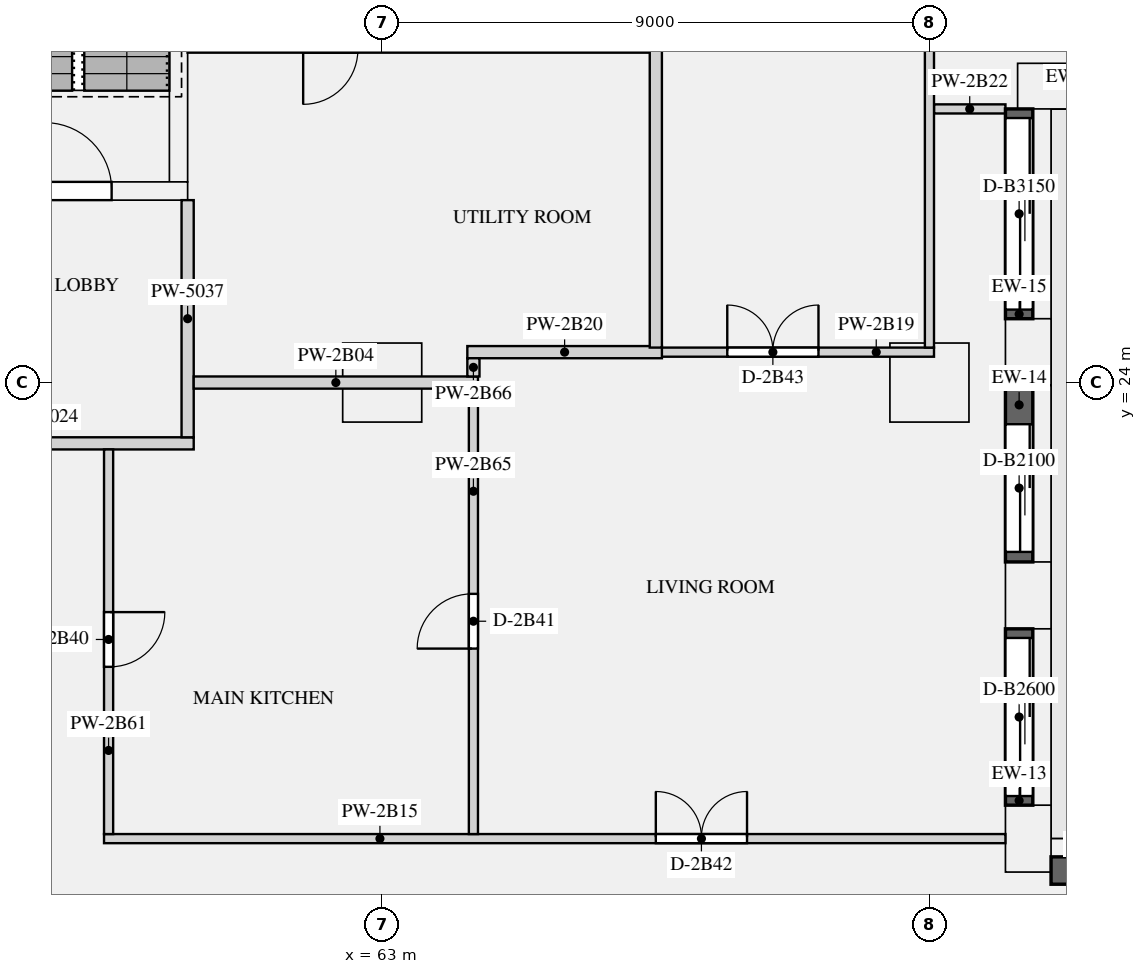
"""IFC4 building model, lengths in metres.
Left out: names, types, materials, properties, quantities, classifications, styles, units other than length and angle.
Written with IfcOpenShell. Run it as: python <this file> out.ifc"""

import sys

from ifc_helpers import new_model, si_unit, direction, frame, frame_2d, origin, origin_2d, place, context, subcontext, project, spatial, rectangle, extrude, element, fill, save


model = new_model("IFC4")
c1 = context("Model", 3, precision=1e-05, world=origin(), true_north=direction((0.0, 1.0)))
c2 = subcontext(c1, "Body", "Model", "MODEL_VIEW")
j1 = project(units=[si_unit("LENGTHUNIT", "METRE"), si_unit("PLANEANGLEUNIT", "RADIAN")], contexts=[c1])
p1 = place(None, origin())
s1 = spatial("IfcSite", under=j1, at=p1, CompositionType="ELEMENT")
p2 = place(p1, origin())
s2 = spatial("IfcBuilding", under=s1, at=p2, CompositionType="ELEMENT")
p3 = place(p2, frame((0.0, 0.0, 93.0)))
s3 = spatial("IfcBuildingStorey", under=s2, at=p3, CompositionType="ELEMENT", Elevation=93.0)
for number, where, z_axis, x_axis in (
    (1, (73.625, 16.5, 0.0), (0.0, 0.0, 1.0), (0.0, 1.0, 0.0)),
    (2, (73.625, 20.5, 0.0), (0.0, 0.0, 1.0), (0.0, 1.0, 0.0)),
    (3, (73.625, 24.5, 0.0), (0.0, 0.0, 1.0), (0.0, 1.0, 0.0)),
    (4, (74.0, 28.875, 0.0), (0.0, 0.0, 1.0), (1.0, 0.0, 0.0)),
):
    element("IfcColumn", number, at=place(p3, frame(where, z_axis=z_axis, x_axis=x_axis)), inside=s3, PredefinedType="USERDEFINED", context=c2, shape_type="SweptSolid", body=[
        extrude(rectangle(XDim=1.1, YDim=0.75, at=origin_2d()), origin(), (0.0, 0.0, 1.0), 3.15),
    ])
for number, where, z_axis, x_axis in (
    (5, (63.0, 24.0, 0.0), (0.0, 0.0, 1.0), (1.0, 0.0, 0.0)),
    (6, (72.0, 24.0, 0.0), (0.0, 0.0, 1.0), (1.0, 0.0, 0.0)),
):
    element("IfcColumn", number, at=place(p3, frame(where, z_axis=z_axis, x_axis=x_axis)), inside=s3, PredefinedType="COLUMN", context=c2, shape_type="SweptSolid", body=[
        extrude(rectangle(XDim=1.3, YDim=1.3, at=origin_2d()), origin(), (0.0, 0.0, 1.0), 3.15),
    ])
p4 = place(p3, frame((56.2, 27.15, 0.0), z_axis=(0.0, 0.0, 1.0), x_axis=(1.0, 0.0, 0.0)))
e7 = element("IfcWall", 7, at=p4, inside=s3, PredefinedType="SHEAR", context=c2, shape_type="SweptSolid", body=[
    extrude(rectangle(XDim=3.6, YDim=0.3, at=frame_2d((1.8, 0.0))), origin(), (0.0, 0.0, 1.0), 3.15),
])
p5 = place(p4, frame((1.25, 0.0, 0.0)))
e8 = element("IfcOpeningElement", 8, at=p5, cuts=e7, PredefinedType="OPENING", context=c2, shape_type="SweptSolid", body=[
    extrude(rectangle(XDim=1.1, YDim=2.1, at=frame_2d((0.55, 1.05))), frame((0.0, 0.16, 0.0), z_axis=(0.0, -1.0, 0.0), x_axis=(1.0, 0.0, 0.0)), (0.0, 0.0, 1.0), 0.32),
])
p6 = place(p3, frame((59.65, 27.3, 0.0), z_axis=(0.0, 0.0, 1.0), x_axis=(0.0, 1.0, 0.0)))
e9 = element("IfcWall", 9, at=p6, inside=s3, PredefinedType="SHEAR", context=c2, shape_type="SweptSolid", body=[
    extrude(rectangle(XDim=7.8, YDim=0.3, at=frame_2d((3.9, 0.0))), origin(), (0.0, 0.0, 1.0), 3.15),
])
p7 = place(p3, frame((75.4, 15.975, 0.9), z_axis=(0.0, 0.0, 1.0), x_axis=(-1.0, 0.0, 0.0)))
e10 = element("IfcWall", 10, at=p7, inside=s3, PredefinedType="SOLIDWALL", context=c2, shape_type="SweptSolid", body=[
    extrude(rectangle(XDim=1.4, YDim=0.45, at=frame_2d((0.7, 0.0))), origin(), (0.0, 0.0, 1.0), 1.93),
])
p8 = place(p3, frame((73.475, 17.05, 0.0), z_axis=(0.0, 0.0, 1.0), x_axis=(0.0, 1.0, 0.0)))
e11 = element("IfcWall", 11, at=p8, inside=s3, PredefinedType="SOLIDWALL", context=c2, shape_type="SweptSolid", body=[
    extrude(rectangle(XDim=2.9, YDim=0.45, at=frame_2d((1.45, 0.0))), origin(), (0.0, 0.0, 1.0), 2.83),
])
p9 = place(p8, frame((0.15, 0.0, 0.0)))
e12 = element("IfcOpeningElement", 12, at=p9, cuts=e11, PredefinedType="OPENING", context=c2, shape_type="SweptSolid", body=[
    extrude(rectangle(XDim=2.6, YDim=2.3, at=frame_2d((1.3, 1.15))), frame((0.0, 0.235, 0.0), z_axis=(0.0, -1.0, 0.0), x_axis=(1.0, 0.0, 0.0)), (0.0, 0.0, 1.0), 0.47),
])
p10 = place(p3, frame((73.475, 21.05, 0.0), z_axis=(0.0, 0.0, 1.0), x_axis=(0.0, 1.0, 0.0)))
e13 = element("IfcWall", 13, at=p10, inside=s3, PredefinedType="SOLIDWALL", context=c2, shape_type="SweptSolid", body=[
    extrude(rectangle(XDim=2.9, YDim=0.45, at=frame_2d((1.45, 0.0))), origin(), (0.0, 0.0, 1.0), 2.83),
])
p11 = place(p10, frame((0.165, 0.0, 0.0)))
e14 = element("IfcOpeningElement", 14, at=p11, cuts=e13, PredefinedType="OPENING", context=c2, shape_type="SweptSolid", body=[
    extrude(rectangle(XDim=2.1, YDim=2.3, at=frame_2d((1.05, 1.15))), frame((0.0, 0.235, 0.0), z_axis=(0.0, -1.0, 0.0), x_axis=(1.0, 0.0, 0.0)), (0.0, 0.0, 1.0), 0.47),
])
p12 = place(p3, frame((73.475, 25.05, 0.0), z_axis=(0.0, 0.0, 1.0), x_axis=(0.0, 1.0, 0.0)))
e15 = element("IfcWall", 15, at=p12, inside=s3, PredefinedType="SOLIDWALL", context=c2, shape_type="SweptSolid", body=[
    extrude(rectangle(XDim=3.45, YDim=0.45, at=frame_2d((1.725, 0.0))), origin(), (0.0, 0.0, 1.0), 2.83),
])
p13 = place(p12, frame((0.15, 0.0, 0.0)))
e16 = element("IfcOpeningElement", 16, at=p13, cuts=e15, PredefinedType="OPENING", context=c2, shape_type="SweptSolid", body=[
    extrude(rectangle(XDim=3.15, YDim=2.3, at=frame_2d((1.575, 1.15))), frame((0.0, 0.235, 0.0), z_axis=(0.0, -1.0, 0.0), x_axis=(1.0, 0.0, 0.0)), (0.0, 0.0, 1.0), 0.47),
])
p14 = place(p3, frame((54.9, 23.0, 0.0), z_axis=(0.0, 0.0, 1.0), x_axis=(1.0, 0.0, 0.0)))
e17 = element("IfcWall", 17, at=p14, inside=s3, PredefinedType="PARTITIONING", context=c2, shape_type="SweptSolid", body=[
    extrude(rectangle(XDim=5.0, YDim=0.2, at=frame_2d((2.5, 0.0))), origin(), (0.0, 0.0, 1.0), 2.83),
])
p15 = place(p3, frame((59.8, 23.1, 0.0), z_axis=(0.0, 0.0, 1.0), x_axis=(0.0, 1.0, 0.0)))
e18 = element("IfcWall", 18, at=p15, inside=s3, PredefinedType="PARTITIONING", context=c2, shape_type="SweptSolid", body=[
    extrude(rectangle(XDim=3.9, YDim=0.2, at=frame_2d((1.95, 0.0))), origin(), (0.0, 0.0, 1.0), 2.83),
])
p16 = place(p3, frame((59.9, 24.0, 0.0), z_axis=(0.0, 0.0, 1.0), x_axis=(1.0, 0.0, 0.0)))
e19 = element("IfcWall", 19, at=p16, inside=s3, PredefinedType="PARTITIONING", context=c2, shape_type="SweptSolid", body=[
    extrude(rectangle(XDim=4.675, YDim=0.2, at=frame_2d((2.337, 0.0))), origin(), (0.0, 0.0, 1.0), 2.83),
])
p17 = place(p3, frame((58.425, 16.5, 0.0), z_axis=(0.0, 0.0, 1.0), x_axis=(1.0, 0.0, 0.0)))
e20 = element("IfcWall", 20, at=p17, inside=s3, PredefinedType="PARTITIONING", context=c2, shape_type="SweptSolid", body=[
    extrude(rectangle(XDim=14.825, YDim=0.15, at=frame_2d((7.413, 0.0))), origin(), (0.0, 0.0, 1.0), 2.83),
])
p18 = place(p17, frame((9.075, 0.0, 0.0)))
e21 = element("IfcOpeningElement", 21, at=p18, cuts=e20, PredefinedType="OPENING", context=c2, shape_type="SweptSolid", body=[
    extrude(rectangle(XDim=1.5, YDim=2.1, at=frame_2d((0.75, 1.05))), frame((0.0, 0.085, 0.0), z_axis=(0.0, -1.0, 0.0), x_axis=(1.0, 0.0, 0.0)), (0.0, 0.0, 1.0), 0.17),
])
p19 = place(p3, frame((67.4, 24.5, 0.0), z_axis=(0.0, 0.0, 1.0), x_axis=(1.0, 0.0, 0.0)))
e22 = element("IfcWall", 22, at=p19, inside=s3, PredefinedType="PARTITIONING", context=c2, shape_type="SweptSolid", body=[
    extrude(rectangle(XDim=4.675, YDim=0.15, at=frame_2d((2.337, 0.0))), origin(), (0.0, 0.0, 1.0), 2.83),
])
p20 = place(p19, frame((1.275, 0.0, 0.0)))
e23 = element("IfcOpeningElement", 23, at=p20, cuts=e22, PredefinedType="OPENING", context=c2, shape_type="SweptSolid", body=[
    extrude(rectangle(XDim=1.5, YDim=2.1, at=frame_2d((0.75, 1.05))), frame((0.0, 0.085, 0.0), z_axis=(0.0, -1.0, 0.0), x_axis=(1.0, 0.0, 0.0)), (0.0, 0.0, 1.0), 0.17),
])
p21 = place(p3, frame((64.4, 24.5, 0.0), z_axis=(0.0, 0.0, 1.0), x_axis=(1.0, 0.0, 0.0)))
e24 = element("IfcWall", 24, at=p21, inside=s3, PredefinedType="PARTITIONING", context=c2, shape_type="SweptSolid", body=[
    extrude(rectangle(XDim=3.2, YDim=0.2, at=frame_2d((1.6, 0.0))), origin(), (0.0, 0.0, 1.0), 2.83),
])
p22 = place(p3, frame((72.075, 28.5, 0.0), z_axis=(0.0, 0.0, 1.0), x_axis=(1.0, 0.0, 0.0)))
e25 = element("IfcWall", 25, at=p22, inside=s3, PredefinedType="PARTITIONING", context=c2, shape_type="SweptSolid", body=[
    extrude(rectangle(XDim=1.175, YDim=0.15, at=frame_2d((0.587, 0.0))), origin(), (0.0, 0.0, 1.0), 2.83),
])
p23 = place(p3, frame((67.5, 24.575, 0.0), z_axis=(0.0, 0.0, 1.0), x_axis=(0.0, 1.0, 0.0)))
e26 = element("IfcWall", 26, at=p23, inside=s3, PredefinedType="PARTITIONING", context=c2, shape_type="SweptSolid", body=[
    extrude(rectangle(XDim=20.175, YDim=0.2, at=frame_2d((10.087, 0.0))), origin(), (0.0, 0.0, 1.0), 2.83),
])
p24 = place(p3, frame((58.5, 16.575, 0.0), z_axis=(0.0, 0.0, 1.0), x_axis=(0.0, 1.0, 0.0)))
e27 = element("IfcWall", 27, at=p24, inside=s3, PredefinedType="PARTITIONING", context=c2, shape_type="SweptSolid", body=[
    extrude(rectangle(XDim=6.325, YDim=0.15, at=frame_2d((3.163, 0.0))), origin(), (0.0, 0.0, 1.0), 2.83),
])
p25 = place(p24, frame((2.75, 0.0, 0.0)))
e28 = element("IfcOpeningElement", 28, at=p25, cuts=e27, PredefinedType="OPENING", context=c2, shape_type="SweptSolid", body=[
    extrude(rectangle(XDim=0.9, YDim=2.1, at=frame_2d((0.45, 1.05))), frame((0.0, 0.085, 0.0), z_axis=(0.0, -1.0, 0.0), x_axis=(1.0, 0.0, 0.0)), (0.0, 0.0, 1.0), 0.17),
])
p26 = place(p3, frame((64.5, 16.575, 0.0), z_axis=(0.0, 0.0, 1.0), x_axis=(0.0, 1.0, 0.0)))
e29 = element("IfcWall", 29, at=p26, inside=s3, PredefinedType="PARTITIONING", context=c2, shape_type="SweptSolid", body=[
    extrude(rectangle(XDim=7.325, YDim=0.15, at=frame_2d((3.663, 0.0))), origin(), (0.0, 0.0, 1.0), 2.83),
])
p27 = place(p26, frame((3.05, 0.0, 0.0)))
e30 = element("IfcOpeningElement", 30, at=p27, cuts=e29, PredefinedType="OPENING", context=c2, shape_type="SweptSolid", body=[
    extrude(rectangle(XDim=0.9, YDim=2.1, at=frame_2d((0.45, 1.05))), frame((0.0, 0.085, 0.0), z_axis=(0.0, -1.0, 0.0), x_axis=(1.0, 0.0, 0.0)), (0.0, 0.0, 1.0), 0.17),
])
p28 = place(p3, frame((64.5, 24.1, 0.0), z_axis=(0.0, 0.0, 1.0), x_axis=(0.0, 1.0, 0.0)))
e31 = element("IfcWall", 31, at=p28, inside=s3, PredefinedType="PARTITIONING", context=c2, shape_type="SweptSolid", body=[
    extrude(rectangle(XDim=0.3, YDim=0.2, at=frame_2d((0.15, 0.0))), origin(), (0.0, 0.0, 1.0), 2.83),
])
p29 = place(p3, frame((72.0, 24.575, 0.0), z_axis=(0.0, 0.0, 1.0), x_axis=(0.0, 1.0, 0.0)))
e32 = element("IfcWall", 32, at=p29, inside=s3, PredefinedType="PARTITIONING", context=c2, shape_type="SweptSolid", body=[
    extrude(rectangle(XDim=15.675, YDim=0.15, at=frame_2d((7.837, 0.0))), origin(), (0.0, 0.0, 1.0), 2.83),
])
p30 = place(p29, frame((6.65, 0.0, 0.0)))
e33 = element("IfcOpeningElement", 33, at=p30, cuts=e32, PredefinedType="OPENING", context=c2, shape_type="SweptSolid", body=[
    extrude(rectangle(XDim=0.9, YDim=2.1, at=frame_2d((0.45, 1.05))), frame((0.0, 0.085, 0.0), z_axis=(0.0, -1.0, 0.0), x_axis=(1.0, 0.0, 0.0)), (0.0, 0.0, 1.0), 0.17),
])
p31 = place(p9, origin())
e34 = element("IfcDoor", 34, at=p31, inside=s3, OperationType="SLIDING_TO_LEFT", PredefinedType="DOOR", context=c2, shape_type="SweptSolid", body=[
    extrude(rectangle(XDim=2.6, YDim=2.3, at=frame_2d((1.3, 1.15))), frame((0.0, -0.07, 0.0), z_axis=(0.0, -1.0, 0.0), x_axis=(1.0, 0.0, 0.0)), (0.0, 0.0, 1.0), 0.05),
])
fill(e12, e34)
p32 = place(p11, origin())
e35 = element("IfcDoor", 35, at=p32, inside=s3, OperationType="SLIDING_TO_LEFT", PredefinedType="DOOR", context=c2, shape_type="SweptSolid", body=[
    extrude(rectangle(XDim=2.1, YDim=2.3, at=frame_2d((1.05, 1.15))), frame((0.0, -0.07, 0.0), z_axis=(0.0, -1.0, 0.0), x_axis=(1.0, 0.0, 0.0)), (0.0, 0.0, 1.0), 0.05),
])
fill(e14, e35)
p33 = place(p13, origin())
e36 = element("IfcDoor", 36, at=p33, inside=s3, OperationType="SLIDING_TO_LEFT", PredefinedType="DOOR", context=c2, shape_type="SweptSolid", body=[
    extrude(rectangle(XDim=3.15, YDim=2.3, at=frame_2d((1.575, 1.15))), frame((0.0, -0.07, 0.0), z_axis=(0.0, -1.0, 0.0), x_axis=(1.0, 0.0, 0.0)), (0.0, 0.0, 1.0), 0.05),
])
fill(e16, e36)
p34 = place(p5, origin())
e37 = element("IfcDoor", 37, at=p34, inside=s3, OperationType="SINGLE_SWING_LEFT", PredefinedType="DOOR", context=c2, shape_type="SweptSolid", body=[
    extrude(rectangle(XDim=1.1, YDim=2.1, at=frame_2d((0.55, 1.05))), frame((0.0, 0.025, 0.0), z_axis=(0.0, -1.0, 0.0), x_axis=(1.0, 0.0, 0.0)), (0.0, 0.0, 1.0), 0.05),
])
fill(e8, e37)
p35 = place(p25, frame((0.9, 0.0, 0.0), z_axis=(0.0, 0.0, 1.0), x_axis=(-1.0, 0.0, 0.0)))
e38 = element("IfcDoor", 38, at=p35, inside=s3, OperationType="SINGLE_SWING_LEFT", PredefinedType="DOOR", context=c2, shape_type="SweptSolid", body=[
    extrude(rectangle(XDim=0.9, YDim=2.1, at=frame_2d((0.45, 1.05))), frame((0.0, 0.025, 0.0), z_axis=(0.0, -1.0, 0.0), x_axis=(1.0, 0.0, 0.0)), (0.0, 0.0, 1.0), 0.05),
])
fill(e28, e38)
p36 = place(p27, origin())
e39 = element("IfcDoor", 39, at=p36, inside=s3, OperationType="SINGLE_SWING_LEFT", PredefinedType="DOOR", context=c2, shape_type="SweptSolid", body=[
    extrude(rectangle(XDim=0.9, YDim=2.1, at=frame_2d((0.45, 1.05))), frame((0.0, 0.025, 0.0), z_axis=(0.0, -1.0, 0.0), x_axis=(1.0, 0.0, 0.0)), (0.0, 0.0, 1.0), 0.05),
])
fill(e30, e39)
p37 = place(p18, origin())
e40 = element("IfcDoor", 40, at=p37, inside=s3, OperationType="DOUBLE_DOOR_SINGLE_SWING", PredefinedType="DOOR", context=c2, shape_type="SweptSolid", body=[
    extrude(rectangle(XDim=1.5, YDim=2.1, at=frame_2d((0.75, 1.05))), frame((0.0, 0.025, 0.0), z_axis=(0.0, -1.0, 0.0), x_axis=(1.0, 0.0, 0.0)), (0.0, 0.0, 1.0), 0.05),
])
fill(e21, e40)
p38 = place(p20, origin())
e41 = element("IfcDoor", 41, at=p38, inside=s3, OperationType="DOUBLE_DOOR_SINGLE_SWING", PredefinedType="DOOR", context=c2, shape_type="SweptSolid", body=[
    extrude(rectangle(XDim=1.5, YDim=2.1, at=frame_2d((0.75, 1.05))), frame((0.0, 0.025, 0.0), z_axis=(0.0, -1.0, 0.0), x_axis=(1.0, 0.0, 0.0)), (0.0, 0.0, 1.0), 0.05),
])
fill(e23, e41)
save(model, sys.argv[1])
